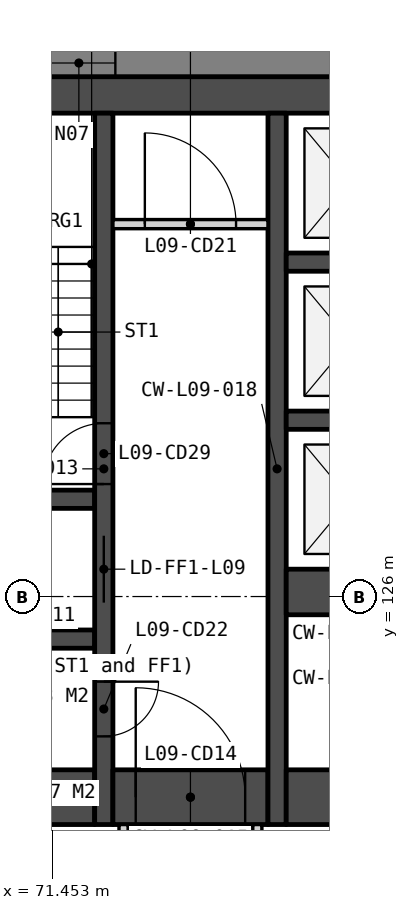
"""IFC4 building model, lengths in metres.
Left out: names, types, materials, properties, quantities, classifications, styles, units other than length and angle.
Written with IfcOpenShell. Run it as: python <this file> out.ifc"""

import sys

from ifc_helpers import new_model, si_unit, direction, frame, frame_2d, origin, place, context, subcontext, project, spatial, polyline, rectangle, outline, extrude, element, fill, save


model = new_model("IFC4")
c1 = context("Model", 3, precision=1e-05, world=origin(), true_north=direction((0.0, 1.0)))
c2 = subcontext(c1, "Body", "Model", "MODEL_VIEW")
j1 = project(units=[si_unit("LENGTHUNIT", "METRE"), si_unit("PLANEANGLEUNIT", "RADIAN")], contexts=[c1])
p1 = place(None, origin())
s1 = spatial("IfcSite", under=j1, at=p1, CompositionType="ELEMENT")
p2 = place(p1, origin())
s2 = spatial("IfcBuilding", under=s1, at=p2, CompositionType="ELEMENT")
p3 = place(p2, frame((0.0, 0.0, 45.5)))
s3 = spatial("IfcBuildingStorey", under=s2, at=p3, CompositionType="ELEMENT", Elevation=45.5)
p4 = place(p3, frame((66.0, 134.25, 0.0), z_axis=(0.0, 0.0, 1.0), x_axis=(1.0, 0.0, 0.0)))
e1 = element("IfcWall", 1, at=p4, inside=s3, PredefinedType="SOLIDWALL", context=c2, shape_type="SweptSolid", body=[
    extrude(rectangle(XDim=28.0, YDim=0.6, at=frame_2d((14.0, 0.0))), origin(), (0.0, 0.0, 1.0), 3.35),
])
for number, where, z_axis, x_axis in (
    (2, (69.6, 127.6, 0.0), (0.0, 0.0, 1.0), (1.0, 0.0, 0.0)),
    (3, (69.6, 125.3, 0.0), (0.0, 0.0, 1.0), (1.0, 0.0, 0.0)),
):
    element("IfcWall", number, at=place(p3, frame(where, z_axis=z_axis, x_axis=x_axis)), inside=s3, PredefinedType="SOLIDWALL", context=c2, shape_type="SweptSolid", body=[
        extrude(rectangle(XDim=2.55, YDim=0.3, at=frame_2d((1.275, 0.0))), origin(), (0.0, 0.0, 1.0), 3.35),
    ])
p5 = place(p3, frame((69.6, 122.7, 0.0), z_axis=(0.0, 0.0, 1.0), x_axis=(1.0, 0.0, 0.0)))
e4 = element("IfcWall", 4, at=p5, inside=s3, PredefinedType="SOLIDWALL", context=c2, shape_type="SweptSolid", body=[
    extrude(rectangle(XDim=2.55, YDim=0.9, at=frame_2d((1.275, 0.0))), origin(), (0.0, 0.0, 1.0), 3.35),
])
p6 = place(p3, frame((72.3, 133.95, 0.0), z_axis=(0.0, 0.0, 1.0), x_axis=(0.0, -1.0, 0.0)))
e5 = element("IfcWall", 5, at=p6, inside=s3, PredefinedType="SOLIDWALL", context=c2, shape_type="SweptSolid", body=[
    extrude(rectangle(XDim=11.7, YDim=0.3, at=frame_2d((5.85, 0.0))), origin(), (0.0, 0.0, 1.0), 3.35),
])
p7 = place(p6, frame((6.95, 0.0, 0.0)))
e6 = element("IfcOpeningElement", 6, at=p7, cuts=e5, PredefinedType="OPENING", context=c2, shape_type="SweptSolid", body=[
    extrude(rectangle(XDim=1.1, YDim=2.1, at=frame_2d((0.55, 1.05))), frame((0.0, 0.16, 0.0), z_axis=(0.0, -1.0, 0.0), x_axis=(1.0, 0.0, 0.0)), (0.0, 0.0, 1.0), 0.32),
])
p8 = place(p6, frame((9.35, 0.0, 0.0)))
e7 = element("IfcOpeningElement", 7, at=p8, cuts=e5, PredefinedType="OPENING", context=c2, shape_type="SweptSolid", body=[
    extrude(rectangle(XDim=0.9, YDim=2.1, at=frame_2d((0.45, 1.05))), frame((0.0, 0.16, 0.0), z_axis=(0.0, -1.0, 0.0), x_axis=(1.0, 0.0, 0.0)), (0.0, 0.0, 1.0), 0.32),
])
p9 = place(p6, frame((5.1, 0.0, 0.0)))
e8 = element("IfcOpeningElement", 8, at=p9, cuts=e5, PredefinedType="OPENING", context=c2, shape_type="SweptSolid", body=[
    extrude(rectangle(XDim=1.0, YDim=2.1, at=frame_2d((0.5, 1.05))), frame((0.0, 0.16, 0.0), z_axis=(0.0, -1.0, 0.0), x_axis=(1.0, 0.0, 0.0)), (0.0, 0.0, 1.0), 0.32),
])
p10 = place(p3, frame((72.45, 132.125, 0.0), z_axis=(0.0, 0.0, 1.0), x_axis=(1.0, 0.0, 0.0)))
e9 = element("IfcWall", 9, at=p10, inside=s3, PredefinedType="PARTITIONING", context=c2, shape_type="SweptSolid", body=[
    extrude(rectangle(XDim=2.55, YDim=0.15, at=frame_2d((1.275, 0.0))), origin(), (0.0, 0.0, 1.0), 3.35),
])
p11 = place(p10, frame((0.525, 0.0, 0.0)))
e10 = element("IfcOpeningElement", 10, at=p11, cuts=e9, PredefinedType="OPENING", context=c2, shape_type="SweptSolid", body=[
    extrude(rectangle(XDim=1.5, YDim=2.1, at=frame_2d((0.75, 1.05))), frame((0.0, 0.085, 0.0), z_axis=(0.0, -1.0, 0.0), x_axis=(1.0, 0.0, 0.0)), (0.0, 0.0, 1.0), 0.17),
])
p12 = place(p3, frame((72.45, 122.7, 0.0), z_axis=(0.0, 0.0, 1.0), x_axis=(1.0, 0.0, 0.0)))
e11 = element("IfcWall", 11, at=p12, inside=s3, PredefinedType="SOLIDWALL", context=c2, shape_type="SweptSolid", body=[
    extrude(rectangle(XDim=2.55, YDim=0.9, at=frame_2d((1.275, 0.0))), origin(), (0.0, 0.0, 1.0), 3.35),
])
p13 = place(p12, frame((0.375, 0.0, 0.0)))
e12 = element("IfcOpeningElement", 12, at=p13, cuts=e11, PredefinedType="OPENING", context=c2, shape_type="SweptSolid", body=[
    extrude(rectangle(XDim=1.8, YDim=2.1, at=frame_2d((0.9, 1.05))), frame((0.0, 0.46, 0.0), z_axis=(0.0, -1.0, 0.0), x_axis=(1.0, 0.0, 0.0)), (0.0, 0.0, 1.0), 0.92),
])
for number, where, z_axis, x_axis in (
    (13, (72.625, 122.25, 0.0), (0.0, 0.0, 1.0), (0.0, -1.0, 0.0)),
    (14, (74.825, 122.25, 0.0), (0.0, 0.0, 1.0), (0.0, -1.0, 0.0)),
):
    element("IfcWall", number, at=place(p3, frame(where, z_axis=z_axis, x_axis=x_axis)), inside=s3, PredefinedType="PARTITIONING", context=c2, shape_type="SweptSolid", body=[
        extrude(rectangle(XDim=2.1, YDim=0.15, at=frame_2d((1.05, 0.0))), origin(), (0.0, 0.0, 1.0), 3.35),
    ])
p14 = place(p3, frame((75.15, 133.95, 0.0), z_axis=(0.0, 0.0, 1.0), x_axis=(0.0, -1.0, 0.0)))
e15 = element("IfcWall", 15, at=p14, inside=s3, PredefinedType="SOLIDWALL", context=c2, shape_type="SweptSolid", body=[
    extrude(rectangle(XDim=11.7, YDim=0.3, at=frame_2d((5.85, 0.0))), origin(), (0.0, 0.0, 1.0), 3.35),
])
for number, where, z_axis, x_axis in (
    (16, (75.3, 131.5, 0.0), (0.0, 0.0, 1.0), (1.0, 0.0, 0.0)),
    (17, (75.3, 128.9, 0.0), (0.0, 0.0, 1.0), (1.0, 0.0, 0.0)),
):
    element("IfcWall", number, at=place(p3, frame(where, z_axis=z_axis, x_axis=x_axis)), inside=s3, PredefinedType="SOLIDWALL", context=c2, shape_type="SweptSolid", body=[
        extrude(rectangle(XDim=2.1, YDim=0.3, at=frame_2d((1.05, 0.0))), origin(), (0.0, 0.0, 1.0), 3.35),
    ])
p15 = place(p3, frame((75.3, 126.075, 0.0), z_axis=(0.0, 0.0, 1.0), x_axis=(1.0, 0.0, 0.0)))
e18 = element("IfcWall", 18, at=p15, inside=s3, PredefinedType="SOLIDWALL", context=c2, shape_type="SweptSolid", body=[
    extrude(rectangle(XDim=2.1, YDim=0.75, at=frame_2d((1.05, 0.0))), origin(), (0.0, 0.0, 1.0), 3.35),
])
p16 = place(p3, frame((75.3, 122.7, 0.0), z_axis=(0.0, 0.0, 1.0), x_axis=(1.0, 0.0, 0.0)))
e19 = element("IfcWall", 19, at=p16, inside=s3, PredefinedType="SOLIDWALL", context=c2, shape_type="SweptSolid", body=[
    extrude(rectangle(XDim=6.2, YDim=0.9, at=frame_2d((3.1, 0.0))), origin(), (0.0, 0.0, 1.0), 3.35),
])
p17 = place(p3, frame((102.4, 134.775, -0.15), z_axis=(0.0, 0.0, 1.0), x_axis=(-1.0, 0.0, 0.0)))
e20 = element("IfcWall", 20, at=p17, inside=s3, PredefinedType="SOLIDWALL", context=c2, shape_type="SweptSolid", body=[
    extrude(outline(polyline([(0.0, 0.0), (0.0, 3.5), (38.62, 3.5), (38.62, 0.0), (0.0, 0.0)])), frame((0.0, 0.225, 0.0), z_axis=(0.0, -1.0, 0.0), x_axis=(1.0, 0.0, 0.0)), (0.0, 0.0, 1.0), 0.45),
])
p18 = place(p17, frame((3.03, 0.0, 1.05)))
e21 = element("IfcOpeningElement", 21, at=p18, cuts=e20, PredefinedType="OPENING", context=c2, shape_type="SweptSolid", body=[
    extrude(rectangle(XDim=1.2, YDim=1.5, at=frame_2d((0.6, 0.75))), frame((0.0, 0.235, 0.0), z_axis=(0.0, -1.0, 0.0), x_axis=(1.0, 0.0, 0.0)), (0.0, 0.0, 1.0), 0.47),
])
p19 = place(p17, frame((4.73, 0.0, 1.05)))
e22 = element("IfcOpeningElement", 22, at=p19, cuts=e20, PredefinedType="OPENING", context=c2, shape_type="SweptSolid", body=[
    extrude(rectangle(XDim=1.2, YDim=1.5, at=frame_2d((0.6, 0.75))), frame((0.0, 0.235, 0.0), z_axis=(0.0, -1.0, 0.0), x_axis=(1.0, 0.0, 0.0)), (0.0, 0.0, 1.0), 0.47),
])
p20 = place(p17, frame((11.99, 0.0, 1.05)))
e23 = element("IfcOpeningElement", 23, at=p20, cuts=e20, PredefinedType="OPENING", context=c2, shape_type="SweptSolid", body=[
    extrude(rectangle(XDim=1.2, YDim=1.5, at=frame_2d((0.6, 0.75))), frame((0.0, 0.235, 0.0), z_axis=(0.0, -1.0, 0.0), x_axis=(1.0, 0.0, 0.0)), (0.0, 0.0, 1.0), 0.47),
])
p21 = place(p17, frame((13.69, 0.0, 1.05)))
e24 = element("IfcOpeningElement", 24, at=p21, cuts=e20, PredefinedType="OPENING", context=c2, shape_type="SweptSolid", body=[
    extrude(rectangle(XDim=1.2, YDim=1.5, at=frame_2d((0.6, 0.75))), frame((0.0, 0.235, 0.0), z_axis=(0.0, -1.0, 0.0), x_axis=(1.0, 0.0, 0.0)), (0.0, 0.0, 1.0), 0.47),
])
p22 = place(p17, frame((20.95, 0.0, 1.05)))
e25 = element("IfcOpeningElement", 25, at=p22, cuts=e20, PredefinedType="OPENING", context=c2, shape_type="SweptSolid", body=[
    extrude(rectangle(XDim=1.2, YDim=1.5, at=frame_2d((0.6, 0.75))), frame((0.0, 0.235, 0.0), z_axis=(0.0, -1.0, 0.0), x_axis=(1.0, 0.0, 0.0)), (0.0, 0.0, 1.0), 0.47),
])
p23 = place(p17, frame((22.65, 0.0, 1.05)))
e26 = element("IfcOpeningElement", 26, at=p23, cuts=e20, PredefinedType="OPENING", context=c2, shape_type="SweptSolid", body=[
    extrude(rectangle(XDim=1.2, YDim=1.5, at=frame_2d((0.6, 0.75))), frame((0.0, 0.235, 0.0), z_axis=(0.0, -1.0, 0.0), x_axis=(1.0, 0.0, 0.0)), (0.0, 0.0, 1.0), 0.47),
])
p24 = place(p17, frame((29.91, 0.0, 1.05)))
e27 = element("IfcOpeningElement", 27, at=p24, cuts=e20, PredefinedType="OPENING", context=c2, shape_type="SweptSolid", body=[
    extrude(rectangle(XDim=1.2, YDim=1.5, at=frame_2d((0.6, 0.75))), frame((0.0, 0.235, 0.0), z_axis=(0.0, -1.0, 0.0), x_axis=(1.0, 0.0, 0.0)), (0.0, 0.0, 1.0), 0.47),
])
p25 = place(p17, frame((31.61, 0.0, 1.05)))
e28 = element("IfcOpeningElement", 28, at=p25, cuts=e20, PredefinedType="OPENING", context=c2, shape_type="SweptSolid", body=[
    extrude(rectangle(XDim=1.2, YDim=1.5, at=frame_2d((0.6, 0.75))), frame((0.0, 0.235, 0.0), z_axis=(0.0, -1.0, 0.0), x_axis=(1.0, 0.0, 0.0)), (0.0, 0.0, 1.0), 0.47),
])
p26 = place(p3, frame((54.495, 129.397, -0.15), z_axis=(0.0, 0.0, 1.0), x_axis=(0.499999201451, -0.866025864826, 0.0)))
e29 = element("IfcWall", 29, at=p26, inside=s3, PredefinedType="SOLIDWALL", context=c2, shape_type="SweptSolid", body=[
    extrude(outline(polyline([(44.8, 0.0), (44.8, 3.5), (0.0, 3.5), (0.0, 0.0), (44.8, 0.0)])), frame((0.0, 0.225, 0.0), z_axis=(0.0, -1.0, 0.0), x_axis=(1.0, 0.0, 0.0)), (0.0, 0.0, 1.0), 0.45),
])
p27 = place(p26, frame((3.03, 0.0, 1.05)))
e30 = element("IfcOpeningElement", 30, at=p27, cuts=e29, PredefinedType="OPENING", context=c2, shape_type="SweptSolid", body=[
    extrude(rectangle(XDim=1.2, YDim=1.5, at=frame_2d((0.6, 0.75))), frame((0.0, 0.235, 0.0), z_axis=(0.0, -1.0, 0.0), x_axis=(1.0, 0.0, 0.0)), (0.0, 0.0, 1.0), 0.47),
])
p28 = place(p26, frame((4.73, 0.0, 1.05)))
e31 = element("IfcOpeningElement", 31, at=p28, cuts=e29, PredefinedType="OPENING", context=c2, shape_type="SweptSolid", body=[
    extrude(rectangle(XDim=1.2, YDim=1.5, at=frame_2d((0.6, 0.75))), frame((0.0, 0.235, 0.0), z_axis=(0.0, -1.0, 0.0), x_axis=(1.0, 0.0, 0.0)), (0.0, 0.0, 1.0), 0.47),
])
p29 = place(p26, frame((11.99, 0.0, 1.05)))
e32 = element("IfcOpeningElement", 32, at=p29, cuts=e29, PredefinedType="OPENING", context=c2, shape_type="SweptSolid", body=[
    extrude(rectangle(XDim=1.2, YDim=1.5, at=frame_2d((0.6, 0.75))), frame((0.0, 0.235, 0.0), z_axis=(0.0, -1.0, 0.0), x_axis=(1.0, 0.0, 0.0)), (0.0, 0.0, 1.0), 0.47),
])
p30 = place(p26, frame((13.69, 0.0, 1.05)))
e33 = element("IfcOpeningElement", 33, at=p30, cuts=e29, PredefinedType="OPENING", context=c2, shape_type="SweptSolid", body=[
    extrude(rectangle(XDim=1.2, YDim=1.5, at=frame_2d((0.6, 0.75))), frame((0.0, 0.235, 0.0), z_axis=(0.0, -1.0, 0.0), x_axis=(1.0, 0.0, 0.0)), (0.0, 0.0, 1.0), 0.47),
])
p31 = place(p26, frame((20.95, 0.0, 1.05)))
e34 = element("IfcOpeningElement", 34, at=p31, cuts=e29, PredefinedType="OPENING", context=c2, shape_type="SweptSolid", body=[
    extrude(rectangle(XDim=1.2, YDim=1.5, at=frame_2d((0.6, 0.75))), frame((0.0, 0.235, 0.0), z_axis=(0.0, -1.0, 0.0), x_axis=(1.0, 0.0, 0.0)), (0.0, 0.0, 1.0), 0.47),
])
p32 = place(p26, frame((22.65, 0.0, 1.05)))
e35 = element("IfcOpeningElement", 35, at=p32, cuts=e29, PredefinedType="OPENING", context=c2, shape_type="SweptSolid", body=[
    extrude(rectangle(XDim=1.2, YDim=1.5, at=frame_2d((0.6, 0.75))), frame((0.0, 0.235, 0.0), z_axis=(0.0, -1.0, 0.0), x_axis=(1.0, 0.0, 0.0)), (0.0, 0.0, 1.0), 0.47),
])
p33 = place(p26, frame((29.91, 0.0, 1.05)))
e36 = element("IfcOpeningElement", 36, at=p33, cuts=e29, PredefinedType="OPENING", context=c2, shape_type="SweptSolid", body=[
    extrude(rectangle(XDim=1.2, YDim=1.5, at=frame_2d((0.6, 0.75))), frame((0.0, 0.235, 0.0), z_axis=(0.0, -1.0, 0.0), x_axis=(1.0, 0.0, 0.0)), (0.0, 0.0, 1.0), 0.47),
])
p34 = place(p26, frame((31.61, 0.0, 1.05)))
e37 = element("IfcOpeningElement", 37, at=p34, cuts=e29, PredefinedType="OPENING", context=c2, shape_type="SweptSolid", body=[
    extrude(rectangle(XDim=1.2, YDim=1.5, at=frame_2d((0.6, 0.75))), frame((0.0, 0.235, 0.0), z_axis=(0.0, -1.0, 0.0), x_axis=(1.0, 0.0, 0.0)), (0.0, 0.0, 1.0), 0.47),
])
p35 = place(p26, frame((38.87, 0.0, 1.05)))
e38 = element("IfcOpeningElement", 38, at=p35, cuts=e29, PredefinedType="OPENING", context=c2, shape_type="SweptSolid", body=[
    extrude(rectangle(XDim=1.2, YDim=1.5, at=frame_2d((0.6, 0.75))), frame((0.0, 0.235, 0.0), z_axis=(0.0, -1.0, 0.0), x_axis=(1.0, 0.0, 0.0)), (0.0, 0.0, 1.0), 0.47),
])
p36 = place(p26, frame((40.57, 0.0, 1.05)))
e39 = element("IfcOpeningElement", 39, at=p36, cuts=e29, PredefinedType="OPENING", context=c2, shape_type="SweptSolid", body=[
    extrude(rectangle(XDim=1.2, YDim=1.5, at=frame_2d((0.6, 0.75))), frame((0.0, 0.235, 0.0), z_axis=(0.0, -1.0, 0.0), x_axis=(1.0, 0.0, 0.0)), (0.0, 0.0, 1.0), 0.47),
])
p37 = place(p7, origin())
e40 = element("IfcDoor", 40, at=p37, inside=s3, OperationType="SLIDING_TO_LEFT", PredefinedType="DOOR", context=c2, shape_type="SweptSolid", body=[
    extrude(rectangle(XDim=1.1, YDim=2.1, at=frame_2d((0.55, 1.05))), frame((0.0, 0.025, 0.0), z_axis=(0.0, -1.0, 0.0), x_axis=(1.0, 0.0, 0.0)), (0.0, 0.0, 1.0), 0.05),
])
fill(e6, e40)
p38 = place(p13, origin())
e41 = element("IfcDoor", 41, at=p38, inside=s3, OperationType="DOUBLE_DOOR_DOUBLE_SWING", PredefinedType="DOOR", context=c2, shape_type="SweptSolid", body=[
    extrude(rectangle(XDim=1.8, YDim=2.1, at=frame_2d((0.9, 1.05))), frame((0.0, 0.025, 0.0), z_axis=(0.0, -1.0, 0.0), x_axis=(1.0, 0.0, 0.0)), (0.0, 0.0, 1.0), 0.05),
])
fill(e12, e41)
p39 = place(p11, origin())
e42 = element("IfcDoor", 42, at=p39, inside=s3, OperationType="DOUBLE_DOOR_DOUBLE_SWING", PredefinedType="DOOR", context=c2, shape_type="SweptSolid", body=[
    extrude(rectangle(XDim=1.5, YDim=2.1, at=frame_2d((0.75, 1.05))), frame((0.0, 0.025, 0.0), z_axis=(0.0, -1.0, 0.0), x_axis=(1.0, 0.0, 0.0)), (0.0, 0.0, 1.0), 0.05),
])
fill(e10, e42)
p40 = place(p8, origin())
e43 = element("IfcDoor", 43, at=p40, inside=s3, OperationType="SINGLE_SWING_LEFT", PredefinedType="DOOR", context=c2, shape_type="SweptSolid", body=[
    extrude(rectangle(XDim=0.9, YDim=2.1, at=frame_2d((0.45, 1.05))), frame((0.0, 0.025, 0.0), z_axis=(0.0, -1.0, 0.0), x_axis=(1.0, 0.0, 0.0)), (0.0, 0.0, 1.0), 0.05),
])
fill(e7, e43)
p41 = place(p9, origin())
e44 = element("IfcDoor", 44, at=p41, inside=s3, OperationType="SINGLE_SWING_RIGHT", PredefinedType="DOOR", context=c2, shape_type="SweptSolid", body=[
    extrude(rectangle(XDim=1.0, YDim=2.1, at=frame_2d((0.5, 1.05))), frame((0.0, 0.025, 0.0), z_axis=(0.0, -1.0, 0.0), x_axis=(1.0, 0.0, 0.0)), (0.0, 0.0, 1.0), 0.05),
])
fill(e8, e44)
p42 = place(p24, origin())
e45 = element("IfcWindow", 45, at=p42, inside=s3, PartitioningType="SINGLE_PANEL", PredefinedType="WINDOW", context=c2, shape_type="SweptSolid", body=[
    extrude(rectangle(XDim=1.2, YDim=1.5, at=frame_2d((0.6, 0.75))), frame((0.0, 0.03, 0.0), z_axis=(0.0, -1.0, 0.0), x_axis=(1.0, 0.0, 0.0)), (0.0, 0.0, 1.0), 0.06),
])
fill(e27, e45)
save(model, sys.argv[1])
